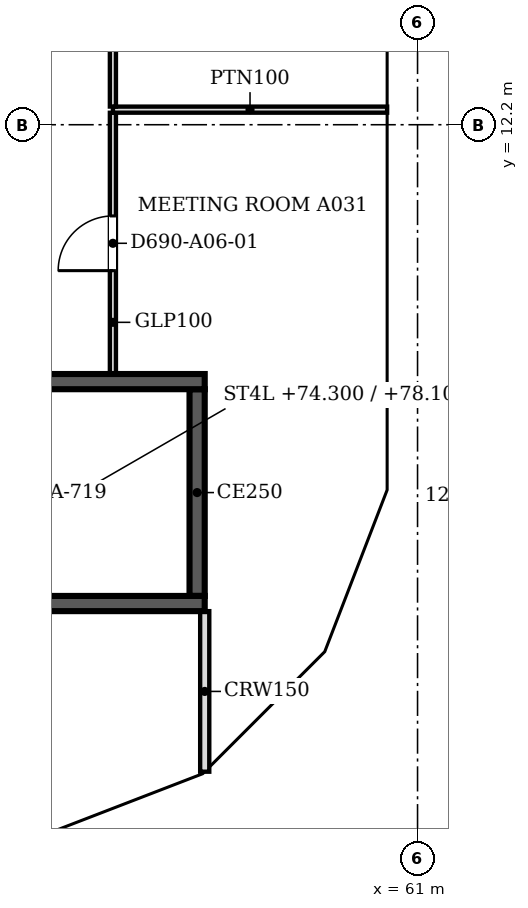
"""IFC4 building model, lengths in metres.
Left out: names, types, materials, properties, quantities, classifications, styles, units other than length and angle.
Written with IfcOpenShell. Run it as: python <this file> out.ifc"""

import sys

from ifc_helpers import new_model, si_unit, direction, frame, frame_2d, origin, place, context, subcontext, project, spatial, polyline, rectangle, outline, extrude, faceted_brep, source, transform, mapped, element, fill, save


model = new_model("IFC4")
c1 = context("Model", 3, precision=1e-05, world=origin(), true_north=direction((0.0, 1.0)))
c2 = subcontext(c1, "Body", "Model", "MODEL_VIEW")
j1 = project(units=[si_unit("LENGTHUNIT", "METRE"), si_unit("PLANEANGLEUNIT", "RADIAN")], contexts=[c1])
p1 = place(None, origin())
s1 = spatial("IfcSite", under=j1, at=p1, CompositionType="ELEMENT")
p2 = place(p1, origin())
s2 = spatial("IfcBuilding", under=s1, at=p2, CompositionType="ELEMENT")
p3 = place(p2, frame((0.0, 0.0, 72.4)))
s3 = spatial("IfcBuildingStorey", under=s2, at=p3, CompositionType="ELEMENT", Elevation=72.4)
m1 = source(origin(), c2, "Body", "Brep", [
    faceted_brep([(2.95, -0.25, 0.0), (3.003, -0.25, 0.068), (3.003, -0.25, 7.531), (2.95, -0.25, 7.6), (0.0, -0.25, 3.8), (0.047, 0.25, 3.86), (2.898, 0.25, 7.532), (2.898, 0.25, 0.068), (0.047, 0.25, 3.74), (2.95, 0.0, 0.0), (2.95, 0.0, 7.6), (0.0, 0.0, 3.8)], [[[0, 1, 2, 3, 4]], [[5, 6, 7, 8]], [[1, 0, 9]], [[10, 3, 2]], [[6, 5, 11, 4, 3, 10]], [[8, 7, 9, 0, 4, 11]], [[8, 11, 5]], [[1, 9, 7, 6, 10, 2]]]),
])
p4 = place(p3, frame((54.854, 0.25, -3.8), z_axis=(0.0, 0.0, 1.0), x_axis=(0.932970071518, 0.359953949349, 0.0)))
e1 = element("IfcWall", 1, at=p4, inside=s3, PredefinedType="SOLIDWALL", context=c2, shape_type="MappedRepresentation", body=[
    mapped(m1, transform((0.0, 0.0, 0.0), scale=1.0)),
])
m2 = source(origin(), c2, "Body", "SweptSolid", [
    extrude(outline(polyline([(2.75, 6.935), (0.316, 3.8), (2.75, 0.665), (2.75, 6.935)])), frame((0.0, 0.26, 0.0), z_axis=(0.0, -1.0, 0.0), x_axis=(1.0, 0.0, 0.0)), (0.0, 0.0, 1.0), 0.52),
])
p5 = place(p4, origin())
e2 = element("IfcOpeningElement", 2, at=p5, cuts=e1, PredefinedType="OPENING", context=c2, shape_type="MappedRepresentation", body=[
    mapped(m2, transform((0.0, 0.0, 0.0), scale=1.0)),
])
m3 = source(origin(), c2, "Body", "Brep", [
    faceted_brep([(0.053, -0.25, 0.0), (2.997, -0.25, 3.8), (0.053, -0.25, 7.6), (0.0, -0.25, 7.532), (0.0, -0.25, 0.068), (0.106, 0.25, 7.531), (2.944, 0.25, 3.868), (2.944, 0.25, 3.732), (0.106, 0.25, 0.068), (2.997, 0.0, 3.8), (0.053, 0.0, 0.0), (0.053, 0.0, 7.6)], [[[0, 1, 2, 3, 4]], [[5, 6, 7, 8]], [[8, 7, 9, 1, 0, 10]], [[6, 5, 11, 2, 1, 9]], [[3, 2, 11]], [[10, 0, 4]], [[8, 10, 4, 3, 11, 5]], [[9, 7, 6]]]),
])
p6 = place(p3, frame((57.569, 1.274, -3.8), z_axis=(0.0, 0.0, 1.0), x_axis=(0.707066050402, 0.707147509625, 0.0)))
e3 = element("IfcWall", 3, at=p6, inside=s3, PredefinedType="SOLIDWALL", context=c2, shape_type="MappedRepresentation", body=[
    mapped(m3, transform((0.0, 0.0, 0.0), scale=1.0)),
])
m4 = source(origin(), c2, "Body", "SweptSolid", [
    extrude(outline(polyline([(0.253, 0.666), (2.681, 3.8), (0.253, 6.934), (0.253, 0.666)])), frame((0.0, 0.26, 0.0), z_axis=(0.0, -1.0, 0.0), x_axis=(1.0, 0.0, 0.0)), (0.0, 0.0, 1.0), 0.52),
])
p7 = place(p6, origin())
e4 = element("IfcOpeningElement", 4, at=p7, cuts=e3, PredefinedType="OPENING", context=c2, shape_type="MappedRepresentation", body=[
    mapped(m4, transform((0.0, 0.0, 0.0), scale=1.0)),
])
m5 = source(origin(), c2, "Body", "Brep", [
    faceted_brep([(2.95, -0.25, 0.0), (2.997, -0.25, 0.059), (2.997, -0.25, 7.541), (2.95, -0.25, 7.6), (0.0, -0.25, 3.8), (0.053, 0.25, 3.868), (2.904, 0.25, 7.54), (2.904, 0.25, 0.06), (0.053, 0.25, 3.732), (2.95, 0.0, 0.0), (2.95, 0.0, 7.6), (0.0, 0.0, 3.8)], [[[0, 1, 2, 3, 4]], [[5, 6, 7, 8]], [[1, 0, 9]], [[10, 3, 2]], [[6, 5, 11, 4, 3, 10]], [[8, 7, 9, 0, 4, 11]], [[8, 11, 5]], [[1, 9, 7, 6, 10, 2]]]),
])
p8 = place(p3, frame((59.688, 3.394, -3.8), z_axis=(0.0, 0.0, 1.0), x_axis=(0.359972353723, 0.932962970624, 0.0)))
e5 = element("IfcWall", 5, at=p8, inside=s3, PredefinedType="SOLIDWALL", context=c2, shape_type="MappedRepresentation", body=[
    mapped(m5, transform((0.0, 0.0, 0.0), scale=1.0)),
])
p9 = place(p8, origin())
e6 = element("IfcOpeningElement", 6, at=p9, cuts=e5, PredefinedType="OPENING", context=c2, shape_type="MappedRepresentation", body=[
    mapped(m2, transform((0.0, 0.0, 0.0), scale=1.0)),
])
m6 = source(origin(), c2, "Body", "Brep", [
    faceted_brep([(0.047, -0.25, 0.0), (3.05, -0.25, 3.8), (0.047, -0.25, 7.6), (0.0, -0.25, 7.54), (0.0, -0.25, 0.06), (0.093, 0.25, 7.541), (3.05, 0.25, 3.8), (0.093, 0.25, 0.059), (0.047, 0.0, 0.0), (0.047, 0.0, 7.6)], [[[0, 1, 2, 3, 4]], [[5, 6, 7]], [[7, 6, 1, 0, 8]], [[6, 5, 9, 2, 1]], [[3, 2, 9]], [[8, 0, 4]], [[7, 8, 4, 3, 9, 5]]]),
])
p10 = place(p3, frame((60.75, 6.1, -3.8), z_axis=(0.0, 0.0, 1.0), x_axis=(0.0, 1.0, 0.0)))
e7 = element("IfcWall", 7, at=p10, inside=s3, PredefinedType="SOLIDWALL", context=c2, shape_type="MappedRepresentation", body=[
    mapped(m6, transform((0.0, 0.0, 0.0), scale=1.0)),
])
m7 = source(origin(), c2, "Body", "SweptSolid", [
    extrude(outline(polyline([(0.247, 0.656), (2.731, 3.8), (0.247, 6.944), (0.247, 0.656)])), frame((0.0, 0.26, 0.0), z_axis=(0.0, -1.0, 0.0), x_axis=(1.0, 0.0, 0.0)), (0.0, 0.0, 1.0), 0.52),
])
p11 = place(p10, origin())
e8 = element("IfcOpeningElement", 8, at=p11, cuts=e7, PredefinedType="OPENING", context=c2, shape_type="MappedRepresentation", body=[
    mapped(m7, transform((0.0, 0.0, 0.0), scale=1.0)),
])
m8 = source(origin(), c2, "Body", "SweptSolid", [
    extrude(outline(polyline([(3.05, 0.0), (6.1, 3.8), (3.05, 7.6), (0.0, 3.8), (3.05, 0.0)])), frame((0.0, 0.25, 0.0), z_axis=(0.0, -1.0, 0.0), x_axis=(1.0, 0.0, 0.0)), (0.0, 0.0, 1.0), 0.5),
])
p12 = place(p3, frame((60.75, 9.15, -3.8), z_axis=(0.0, 0.0, 1.0), x_axis=(0.0, 1.0, 0.0)))
e9 = element("IfcWall", 9, at=p12, inside=s3, PredefinedType="SOLIDWALL", context=c2, shape_type="MappedRepresentation", body=[
    mapped(m8, transform((0.0, 0.0, 0.0), scale=1.0)),
])
m9 = source(origin(), c2, "Body", "SweptSolid", [
    extrude(outline(polyline([(3.05, 0.399), (5.78, 3.8), (3.05, 7.2), (0.321, 3.8), (3.05, 0.399)])), frame((0.0, 0.26, 0.0), z_axis=(0.0, -1.0, 0.0), x_axis=(1.0, 0.0, 0.0)), (0.0, 0.0, 1.0), 0.52),
])
p13 = place(p12, origin())
e10 = element("IfcOpeningElement", 10, at=p13, cuts=e9, PredefinedType="OPENING", context=c2, shape_type="MappedRepresentation", body=[
    mapped(m9, transform((0.0, 0.0, 0.0), scale=1.0)),
])
p14 = place(p2, frame((0.0, 0.0, 76.2)))
s4 = spatial("IfcBuildingStorey", under=s2, at=p14, CompositionType="ELEMENT", Elevation=76.2)
m10 = source(origin(), c2, "Body", "Brep", [
    faceted_brep([(0.047, -0.25, 0.0), (2.997, -0.25, 3.8), (0.047, -0.25, 7.6), (0.0, -0.25, 7.541), (0.0, -0.25, 0.059), (0.093, 0.25, 7.54), (2.944, 0.25, 3.868), (2.944, 0.25, 3.732), (0.093, 0.25, 0.06), (2.997, 0.0, 3.8), (0.047, 0.0, 0.0), (0.047, 0.0, 7.6)], [[[0, 1, 2, 3, 4]], [[5, 6, 7, 8]], [[8, 7, 9, 1, 0, 10]], [[6, 5, 11, 2, 1, 9]], [[3, 2, 11]], [[10, 0, 4]], [[8, 10, 4, 3, 11, 5]], [[9, 7, 6]]]),
])
p15 = place(p14, frame((54.81, 0.233, -3.8), z_axis=(0.0, 0.0, 1.0), x_axis=(0.932990326376, 0.359901446078, 0.0)))
e11 = element("IfcWall", 11, at=p15, inside=s4, PredefinedType="SOLIDWALL", context=c2, shape_type="MappedRepresentation", body=[
    mapped(m10, transform((0.0, 0.0, 0.0), scale=1.0)),
])
m11 = source(origin(), c2, "Body", "SweptSolid", [
    extrude(outline(polyline([(0.247, 0.665), (2.681, 3.8), (0.247, 6.935), (0.247, 0.665)])), frame((0.0, 0.26, 0.0), z_axis=(0.0, -1.0, 0.0), x_axis=(1.0, 0.0, 0.0)), (0.0, 0.0, 1.0), 0.52),
])
p16 = place(p15, origin())
e12 = element("IfcOpeningElement", 12, at=p16, cuts=e11, PredefinedType="OPENING", context=c2, shape_type="MappedRepresentation", body=[
    mapped(m11, transform((0.0, 0.0, 0.0), scale=1.0)),
])
m12 = source(origin(), c2, "Body", "Brep", [
    faceted_brep([(2.944, -0.25, 0.0), (2.997, -0.25, 0.068), (2.997, -0.25, 7.532), (2.944, -0.25, 7.6), (0.0, -0.25, 3.8), (0.053, 0.25, 3.868), (2.891, 0.25, 7.532), (2.891, 0.25, 0.068), (0.053, 0.25, 3.732), (2.944, 0.0, 0.0), (2.944, 0.0, 7.6), (0.0, 0.0, 3.8)], [[[0, 1, 2, 3, 4]], [[5, 6, 7, 8]], [[1, 0, 9]], [[10, 3, 2]], [[6, 5, 11, 4, 3, 10]], [[8, 7, 9, 0, 4, 11]], [[8, 11, 5]], [[1, 9, 7, 6, 10, 2]]]),
])
p17 = place(p14, frame((57.606, 1.312, -3.8), z_axis=(0.0, 0.0, 1.0), x_axis=(0.707147509625, 0.707066050402, 0.0)))
e13 = element("IfcWall", 13, at=p17, inside=s4, PredefinedType="SOLIDWALL", context=c2, shape_type="MappedRepresentation", body=[
    mapped(m12, transform((0.0, 0.0, 0.0), scale=1.0)),
])
m13 = source(origin(), c2, "Body", "SweptSolid", [
    extrude(outline(polyline([(2.744, 6.934), (0.316, 3.8), (2.744, 0.667), (2.744, 6.934)])), frame((0.0, 0.26, 0.0), z_axis=(0.0, -1.0, 0.0), x_axis=(1.0, 0.0, 0.0)), (0.0, 0.0, 1.0), 0.52),
])
p18 = place(p17, origin())
e14 = element("IfcOpeningElement", 14, at=p18, cuts=e13, PredefinedType="OPENING", context=c2, shape_type="MappedRepresentation", body=[
    mapped(m13, transform((0.0, 0.0, 0.0), scale=1.0)),
])
m14 = source(origin(), c2, "Body", "Brep", [
    faceted_brep([(0.053, -0.25, 0.0), (3.003, -0.25, 3.8), (0.053, -0.25, 7.6), (0.0, -0.25, 7.532), (0.0, -0.25, 0.068), (0.106, 0.25, 7.532), (2.957, 0.25, 3.86), (2.957, 0.25, 3.74), (0.106, 0.25, 0.068), (3.003, 0.0, 3.8), (0.053, 0.0, 0.0), (0.053, 0.0, 7.6)], [[[0, 1, 2, 3, 4]], [[5, 6, 7, 8]], [[8, 7, 9, 1, 0, 10]], [[6, 5, 11, 2, 1, 9]], [[3, 2, 11]], [[10, 0, 4]], [[8, 10, 4, 3, 11, 5]], [[9, 7, 6]]]),
])
p19 = place(p14, frame((59.669, 3.344, -3.8), z_axis=(0.0, 0.0, 1.0), x_axis=(0.35992665181, 0.932980602862, 0.0)))
e15 = element("IfcWall", 15, at=p19, inside=s4, PredefinedType="SOLIDWALL", context=c2, shape_type="MappedRepresentation", body=[
    mapped(m14, transform((0.0, 0.0, 0.0), scale=1.0)),
])
m15 = source(origin(), c2, "Body", "SweptSolid", [
    extrude(outline(polyline([(0.253, 0.665), (2.687, 3.8), (0.253, 6.935), (0.253, 0.665)])), frame((0.0, 0.26, 0.0), z_axis=(0.0, -1.0, 0.0), x_axis=(1.0, 0.0, 0.0)), (0.0, 0.0, 1.0), 0.52),
])
p20 = place(p19, origin())
e16 = element("IfcOpeningElement", 16, at=p20, cuts=e15, PredefinedType="OPENING", context=c2, shape_type="MappedRepresentation", body=[
    mapped(m15, transform((0.0, 0.0, 0.0), scale=1.0)),
])
m16 = source(origin(), c2, "Body", "Brep", [
    faceted_brep([(3.003, -0.25, 0.0), (6.053, -0.25, 3.8), (3.003, -0.25, 7.6), (0.0, -0.25, 3.8), (0.047, 0.25, 3.859), (3.003, 0.25, 7.6), (6.053, 0.25, 3.8), (3.003, 0.25, 0.0), (0.047, 0.25, 3.741), (0.0, 0.0, 3.8)], [[[0, 1, 2, 3]], [[4, 5, 6, 7, 8]], [[7, 6, 1, 0]], [[6, 5, 2, 1]], [[5, 4, 9, 3, 2]], [[8, 7, 0, 3, 9]], [[8, 9, 4]]]),
])
p21 = place(p14, frame((60.75, 6.146, -3.8), z_axis=(0.0, 0.0, 1.0), x_axis=(0.0, 1.0, 0.0)))
e17 = element("IfcWall", 17, at=p21, inside=s4, PredefinedType="SOLIDWALL", context=c2, shape_type="MappedRepresentation", body=[
    mapped(m16, transform((0.0, 0.0, 0.0), scale=1.0)),
])
m17 = source(origin(), c2, "Body", "SweptSolid", [
    extrude(outline(polyline([(3.005, 0.401), (5.733, 3.8), (3.005, 7.199), (0.319, 3.8), (3.005, 0.401)])), frame((0.0, 0.26, 0.0), z_axis=(0.0, -1.0, 0.0), x_axis=(1.0, 0.0, 0.0)), (0.0, 0.0, 1.0), 0.52),
])
p22 = place(p21, origin())
e18 = element("IfcOpeningElement", 18, at=p22, cuts=e17, PredefinedType="OPENING", context=c2, shape_type="MappedRepresentation", body=[
    mapped(m17, transform((0.0, 0.0, 0.0), scale=1.0)),
])
m18 = source(origin(), c2, "Body", "SweptSolid", [
    extrude(outline(polyline([(3.05, 0.0), (6.1, 3.8), (3.05, 7.6), (0.0, 3.8), (3.05, 0.0)])), frame((0.0, 0.25, 0.0), z_axis=(0.0, -1.0, 0.0), x_axis=(1.0, 0.0, 0.0)), (0.0, 0.0, 1.0), 0.5),
])
p23 = place(p14, frame((60.75, 12.2, -3.8), z_axis=(0.0, 0.0, 1.0), x_axis=(0.0, 1.0, 0.0)))
e19 = element("IfcWall", 19, at=p23, inside=s4, PredefinedType="SOLIDWALL", context=c2, shape_type="MappedRepresentation", body=[
    mapped(m18, transform((0.0, 0.0, 0.0), scale=1.0)),
])
m19 = source(origin(), c2, "Body", "SweptSolid", [
    extrude(outline(polyline([(3.05, 0.399), (5.78, 3.8), (3.05, 7.201), (0.321, 3.8), (3.05, 0.399)])), frame((0.0, 0.26, 0.0), z_axis=(0.0, -1.0, 0.0), x_axis=(1.0, 0.0, 0.0)), (0.0, 0.0, 1.0), 0.52),
])
p24 = place(p23, origin())
e20 = element("IfcOpeningElement", 20, at=p24, cuts=e19, PredefinedType="OPENING", context=c2, shape_type="MappedRepresentation", body=[
    mapped(m19, transform((0.0, 0.0, 0.0), scale=1.0)),
])
p25 = place(p3, frame((57.5, 4.325, 0.0), z_axis=(0.0, 0.0, 1.0), x_axis=(-1.0, 0.0, 0.0)))
e21 = element("IfcWall", 21, at=p25, inside=s3, PredefinedType="SOLIDWALL", context=c2, shape_type="SweptSolid", body=[
    extrude(rectangle(XDim=8.5, YDim=0.25, at=frame_2d((4.25, 0.0))), origin(), (0.0, 0.0, 1.0), 3.8),
])
m20 = source(origin(), c2, "Body", "SweptSolid", [
    extrude(rectangle(XDim=1.2, YDim=2.1, at=frame_2d((0.6, 1.05))), frame((0.0, 0.135, 0.0), z_axis=(0.0, -1.0, 0.0), x_axis=(1.0, 0.0, 0.0)), (0.0, 0.0, 1.0), 0.27),
])
p26 = place(p25, frame((6.9, 0.0, 0.0)))
e22 = element("IfcOpeningElement", 22, at=p26, cuts=e21, PredefinedType="OPENING", context=c2, shape_type="MappedRepresentation", body=[
    mapped(m20, transform((0.0, 0.0, 0.0), scale=1.0)),
])
p27 = place(p3, frame((49.0, 7.975, 0.0), z_axis=(0.0, 0.0, 1.0), x_axis=(1.0, 0.0, 0.0)))
e23 = element("IfcWall", 23, at=p27, inside=s3, PredefinedType="SOLIDWALL", context=c2, shape_type="SweptSolid", body=[
    extrude(rectangle(XDim=8.5, YDim=0.25, at=frame_2d((4.25, 0.0))), origin(), (0.0, 0.0, 1.0), 3.8),
])
p28 = place(p3, frame((57.375, 7.85, 0.0), z_axis=(0.0, 0.0, 1.0), x_axis=(0.0, -1.0, 0.0)))
e24 = element("IfcWall", 24, at=p28, inside=s3, PredefinedType="SOLIDWALL", context=c2, shape_type="SweptSolid", body=[
    extrude(rectangle(XDim=3.4, YDim=0.25, at=frame_2d((1.7, 0.0))), origin(), (0.0, 0.0, 1.0), 3.8),
])
p29 = place(p3, frame((57.5, 1.559, 0.0), z_axis=(0.0, 0.0, 1.0), x_axis=(0.0, 1.0, 0.0)))
e25 = element("IfcWall", 25, at=p29, inside=s3, PredefinedType="PARTITIONING", context=c2, shape_type="SweptSolid", body=[
    extrude(rectangle(XDim=2.641, YDim=0.15, at=frame_2d((1.32, 0.0))), origin(), (0.0, 0.0, 1.0), 3.067),
])
p30 = place(p3, frame((55.99, 12.397, 0.0), z_axis=(0.0, 0.0, 1.0), x_axis=(0.0, -1.0, 0.0)))
e26 = element("IfcWall", 26, at=p30, inside=s3, PredefinedType="PARTITIONING", context=c2, shape_type="SweptSolid", body=[
    extrude(rectangle(XDim=4.297, YDim=0.1, at=frame_2d((2.148, 0.0))), origin(), (0.0, 0.0, 1.0), 3.067),
])
m21 = source(origin(), c2, "Body", "SweptSolid", [
    extrude(rectangle(XDim=0.9, YDim=2.1, at=frame_2d((0.45, 1.05))), frame((0.0, 0.06, 0.0), z_axis=(0.0, -1.0, 0.0), x_axis=(1.0, 0.0, 0.0)), (0.0, 0.0, 1.0), 0.12),
])
p31 = place(p30, frame((1.697, 0.0, 0.0)))
e27 = element("IfcOpeningElement", 27, at=p31, cuts=e26, PredefinedType="OPENING", context=c2, shape_type="MappedRepresentation", body=[
    mapped(m21, transform((0.0, 0.0, 0.0), scale=1.0)),
])
p32 = place(p3, frame((55.99, 12.448, 0.0), z_axis=(0.0, 0.0, 1.0), x_axis=(1.0, 0.0, 0.0)))
e28 = element("IfcWall", 28, at=p32, inside=s3, PredefinedType="PARTITIONING", context=c2, shape_type="SweptSolid", body=[
    extrude(rectangle(XDim=4.51, YDim=0.1, at=frame_2d((2.255, 0.0))), origin(), (0.0, 0.0, 1.0), 3.067),
])
p33 = place(p3, frame((55.99, 17.024, 0.0), z_axis=(0.0, 0.0, 1.0), x_axis=(0.0, -1.0, 0.0)))
e29 = element("IfcWall", 29, at=p33, inside=s3, PredefinedType="PARTITIONING", context=c2, shape_type="SweptSolid", body=[
    extrude(rectangle(XDim=4.525, YDim=0.1, at=frame_2d((2.263, 0.0))), origin(), (0.0, 0.0, 1.0), 3.067),
])
p34 = place(p33, frame((1.825, 0.0, 0.0)))
e30 = element("IfcOpeningElement", 30, at=p34, cuts=e29, PredefinedType="OPENING", context=c2, shape_type="MappedRepresentation", body=[
    mapped(m21, transform((0.0, 0.0, 0.0), scale=1.0)),
])
m22 = source(origin(), c2, "Body", "SweptSolid", [
    extrude(rectangle(XDim=0.9, YDim=2.1, at=frame_2d((0.45, 1.05))), frame((0.0, 0.025, 0.0), z_axis=(0.0, -1.0, 0.0), x_axis=(1.0, 0.0, 0.0)), (0.0, 0.0, 1.0), 0.05),
])
p35 = place(p31, origin())
e31 = element("IfcDoor", 31, at=p35, inside=s3, OperationType="SINGLE_SWING_RIGHT", PredefinedType="DOOR", context=c2, shape_type="MappedRepresentation", body=[
    mapped(m22, transform((0.0, 0.0, 0.0), scale=1.0)),
])
fill(e27, e31)
save(model, sys.argv[1])
